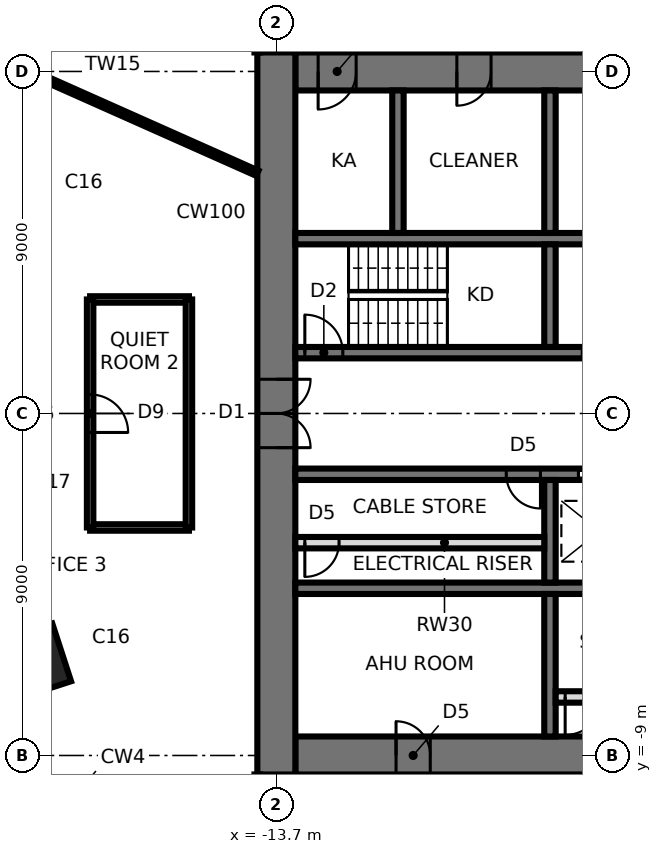
"""IFC4 building model, lengths in metres.
Left out: names, types, materials, properties, quantities, classifications, styles, units other than length and angle.
Written with IfcOpenShell. Run it as: python <this file> out.ifc"""

import sys

from ifc_helpers import new_model, si_unit, direction, frame, frame_2d, origin, origin_2d, place, context, subcontext, project, spatial, rectangle, extrude, element, fill, save


model = new_model("IFC4")
c1 = context("Model", 3, precision=1e-05, world=origin(), true_north=direction((0.0, 1.0)))
c2 = subcontext(c1, "Body", "Model", "MODEL_VIEW")
j1 = project(units=[si_unit("LENGTHUNIT", "METRE"), si_unit("PLANEANGLEUNIT", "RADIAN")], contexts=[c1])
p1 = place(None, origin())
s1 = spatial("IfcSite", under=j1, at=p1, CompositionType="ELEMENT")
p2 = place(p1, origin())
s2 = spatial("IfcBuilding", under=s1, at=p2, CompositionType="ELEMENT")
p3 = place(p2, frame((0.0, 0.0, 127.5)))
s3 = spatial("IfcBuildingStorey", under=s2, at=p3, CompositionType="ELEMENT", Elevation=127.5)
p4 = place(p3, frame((-20.109, -6.534, 0.0), z_axis=(0.0, 0.0, 1.0), x_axis=(-0.951056516295, -0.309016994375, 0.0)))
e1 = element("IfcColumn", 1, at=p4, inside=s3, PredefinedType="COLUMN", context=c2, shape_type="SweptSolid", body=[
    extrude(rectangle(XDim=1.6, YDim=1.6, at=origin_2d()), origin(), (0.0, 0.0, 1.0), 3.9),
])
p5 = place(p3, frame((-13.2, -9.0, 0.0), z_axis=(0.0, 0.0, 1.0), x_axis=(1.0, 0.0, 0.0)))
e2 = element("IfcWall", 2, at=p5, inside=s3, PredefinedType="SHEAR", context=c2, shape_type="SweptSolid", body=[
    extrude(rectangle(XDim=26.4, YDim=1.0, at=frame_2d((13.2, 0.0))), origin(), (0.0, 0.0, 1.0), 3.9),
])
p6 = place(p5, frame((2.65, 0.0, 0.0)))
e3 = element("IfcOpeningElement", 3, at=p6, cuts=e2, PredefinedType="OPENING", context=c2, shape_type="SweptSolid", body=[
    extrude(rectangle(XDim=0.9, YDim=2.1, at=frame_2d((0.45, 1.05))), frame((0.0, 0.51, 0.0), z_axis=(0.0, -1.0, 0.0), x_axis=(1.0, 0.0, 0.0)), (0.0, 0.0, 1.0), 1.02),
])
p7 = place(p5, frame((9.5, 0.0, 0.0)))
e4 = element("IfcOpeningElement", 4, at=p7, cuts=e2, PredefinedType="OPENING", context=c2, shape_type="SweptSolid", body=[
    extrude(rectangle(XDim=0.9, YDim=2.1, at=frame_2d((0.45, 1.05))), frame((0.0, 0.51, 0.0), z_axis=(0.0, -1.0, 0.0), x_axis=(1.0, 0.0, 0.0)), (0.0, 0.0, 1.0), 1.02),
])
p8 = place(p5, frame((16.0, 0.0, 0.0)))
e5 = element("IfcOpeningElement", 5, at=p8, cuts=e2, PredefinedType="OPENING", context=c2, shape_type="SweptSolid", body=[
    extrude(rectangle(XDim=0.9, YDim=2.1, at=frame_2d((0.45, 1.05))), frame((0.0, 0.51, 0.0), z_axis=(0.0, -1.0, 0.0), x_axis=(1.0, 0.0, 0.0)), (0.0, 0.0, 1.0), 1.02),
])
p9 = place(p5, frame((22.85, 0.0, 0.0)))
e6 = element("IfcOpeningElement", 6, at=p9, cuts=e2, PredefinedType="OPENING", context=c2, shape_type="SweptSolid", body=[
    extrude(rectangle(XDim=0.9, YDim=2.1, at=frame_2d((0.45, 1.05))), frame((0.0, 0.51, 0.0), z_axis=(0.0, -1.0, 0.0), x_axis=(1.0, 0.0, 0.0)), (0.0, 0.0, 1.0), 1.02),
])
p10 = place(p3, frame((13.2, 9.0, 0.0), z_axis=(0.0, 0.0, 1.0), x_axis=(-1.0, 0.0, 0.0)))
e7 = element("IfcWall", 7, at=p10, inside=s3, PredefinedType="SHEAR", context=c2, shape_type="SweptSolid", body=[
    extrude(rectangle(XDim=26.4, YDim=1.0, at=frame_2d((13.2, 0.0))), origin(), (0.0, 0.0, 1.0), 3.9),
])
p11 = place(p10, frame((2.65, 0.0, 0.0)))
e8 = element("IfcOpeningElement", 8, at=p11, cuts=e7, PredefinedType="OPENING", context=c2, shape_type="SweptSolid", body=[
    extrude(rectangle(XDim=0.9, YDim=2.1, at=frame_2d((0.45, 1.05))), frame((0.0, 0.51, 0.0), z_axis=(0.0, -1.0, 0.0), x_axis=(1.0, 0.0, 0.0)), (0.0, 0.0, 1.0), 1.02),
])
p12 = place(p10, frame((9.5, 0.0, 0.0)))
e9 = element("IfcOpeningElement", 9, at=p12, cuts=e7, PredefinedType="OPENING", context=c2, shape_type="SweptSolid", body=[
    extrude(rectangle(XDim=0.9, YDim=2.1, at=frame_2d((0.45, 1.05))), frame((0.0, 0.51, 0.0), z_axis=(0.0, -1.0, 0.0), x_axis=(1.0, 0.0, 0.0)), (0.0, 0.0, 1.0), 1.02),
])
p13 = place(p10, frame((16.0, 0.0, 0.0)))
e10 = element("IfcOpeningElement", 10, at=p13, cuts=e7, PredefinedType="OPENING", context=c2, shape_type="SweptSolid", body=[
    extrude(rectangle(XDim=0.9, YDim=2.1, at=frame_2d((0.45, 1.05))), frame((0.0, 0.51, 0.0), z_axis=(0.0, -1.0, 0.0), x_axis=(1.0, 0.0, 0.0)), (0.0, 0.0, 1.0), 1.02),
])
p14 = place(p10, frame((21.25, 0.0, 0.0)))
e11 = element("IfcOpeningElement", 11, at=p14, cuts=e7, PredefinedType="OPENING", context=c2, shape_type="SweptSolid", body=[
    extrude(rectangle(XDim=0.9, YDim=2.1, at=frame_2d((0.45, 1.05))), frame((0.0, 0.51, 0.0), z_axis=(0.0, -1.0, 0.0), x_axis=(1.0, 0.0, 0.0)), (0.0, 0.0, 1.0), 1.02),
])
p15 = place(p10, frame((24.8, 0.0, 0.0)))
e12 = element("IfcOpeningElement", 12, at=p15, cuts=e7, PredefinedType="OPENING", context=c2, shape_type="SweptSolid", body=[
    extrude(rectangle(XDim=1.0, YDim=2.1, at=frame_2d((0.5, 1.05))), frame((0.0, 0.51, 0.0), z_axis=(0.0, -1.0, 0.0), x_axis=(1.0, 0.0, 0.0)), (0.0, 0.0, 1.0), 1.02),
])
p16 = place(p3, frame((-13.7, 9.5, 0.0), z_axis=(0.0, 0.0, 1.0), x_axis=(0.0, -1.0, 0.0)))
e13 = element("IfcWall", 13, at=p16, inside=s3, PredefinedType="SHEAR", context=c2, shape_type="SweptSolid", body=[
    extrude(rectangle(XDim=19.0, YDim=1.0, at=frame_2d((9.5, 0.0))), origin(), (0.0, 0.0, 1.0), 3.9),
])
p17 = place(p16, frame((8.6, 0.0, 0.0)))
e14 = element("IfcOpeningElement", 14, at=p17, cuts=e13, PredefinedType="OPENING", context=c2, shape_type="SweptSolid", body=[
    extrude(rectangle(XDim=1.8, YDim=2.4, at=frame_2d((0.9, 1.2))), frame((0.0, 0.51, 0.0), z_axis=(0.0, -1.0, 0.0), x_axis=(1.0, 0.0, 0.0)), (0.0, 0.0, 1.0), 1.02),
])
p18 = place(p3, frame((-13.2, 1.6, 0.0), z_axis=(0.0, 0.0, 1.0), x_axis=(1.0, 0.0, 0.0)))
e15 = element("IfcWall", 15, at=p18, inside=s3, PredefinedType="SHEAR", context=c2, shape_type="SweptSolid", body=[
    extrude(rectangle(XDim=26.4, YDim=0.3, at=frame_2d((13.2, 0.0))), origin(), (0.0, 0.0, 1.0), 3.9),
])
p19 = place(p18, frame((0.25, 0.0, 0.0)))
e16 = element("IfcOpeningElement", 16, at=p19, cuts=e15, PredefinedType="OPENING", context=c2, shape_type="SweptSolid", body=[
    extrude(rectangle(XDim=1.0, YDim=2.1, at=frame_2d((0.5, 1.05))), frame((0.0, 0.16, 0.0), z_axis=(0.0, -1.0, 0.0), x_axis=(1.0, 0.0, 0.0)), (0.0, 0.0, 1.0), 0.32),
])
p20 = place(p18, frame((20.25, 0.0, 0.0)))
e17 = element("IfcOpeningElement", 17, at=p20, cuts=e15, PredefinedType="OPENING", context=c2, shape_type="SweptSolid", body=[
    extrude(rectangle(XDim=1.5, YDim=2.4, at=frame_2d((0.75, 1.2))), frame((0.0, 0.16, 0.0), z_axis=(0.0, -1.0, 0.0), x_axis=(1.0, 0.0, 0.0)), (0.0, 0.0, 1.0), 0.32),
])
p21 = place(p18, frame((7.55, 0.0, 0.0)))
e18 = element("IfcOpeningElement", 18, at=p21, cuts=e15, PredefinedType="OPENING", context=c2, shape_type="SweptSolid", body=[
    extrude(rectangle(XDim=0.9, YDim=2.1, at=frame_2d((0.45, 1.05))), frame((0.0, 0.16, 0.0), z_axis=(0.0, -1.0, 0.0), x_axis=(1.0, 0.0, 0.0)), (0.0, 0.0, 1.0), 0.32),
])
p22 = place(p18, frame((10.15, 0.0, 0.0)))
e19 = element("IfcOpeningElement", 19, at=p22, cuts=e15, PredefinedType="OPENING", context=c2, shape_type="SweptSolid", body=[
    extrude(rectangle(XDim=0.9, YDim=2.1, at=frame_2d((0.45, 1.05))), frame((0.0, 0.16, 0.0), z_axis=(0.0, -1.0, 0.0), x_axis=(1.0, 0.0, 0.0)), (0.0, 0.0, 1.0), 0.32),
])
p23 = place(p18, frame((12.75, 0.0, 0.0)))
e20 = element("IfcOpeningElement", 20, at=p23, cuts=e15, PredefinedType="OPENING", context=c2, shape_type="SweptSolid", body=[
    extrude(rectangle(XDim=0.9, YDim=2.1, at=frame_2d((0.45, 1.05))), frame((0.0, 0.16, 0.0), z_axis=(0.0, -1.0, 0.0), x_axis=(1.0, 0.0, 0.0)), (0.0, 0.0, 1.0), 0.32),
])
p24 = place(p18, frame((24.15, 0.0, 0.0)))
e21 = element("IfcOpeningElement", 21, at=p24, cuts=e15, PredefinedType="OPENING", context=c2, shape_type="SweptSolid", body=[
    extrude(rectangle(XDim=0.9, YDim=2.1, at=frame_2d((0.45, 1.05))), frame((0.0, 0.16, 0.0), z_axis=(0.0, -1.0, 0.0), x_axis=(1.0, 0.0, 0.0)), (0.0, 0.0, 1.0), 0.32),
])
p25 = place(p3, frame((-13.2, -1.6, 0.0), z_axis=(0.0, 0.0, 1.0), x_axis=(1.0, 0.0, 0.0)))
e22 = element("IfcWall", 22, at=p25, inside=s3, PredefinedType="SHEAR", context=c2, shape_type="SweptSolid", body=[
    extrude(rectangle(XDim=26.4, YDim=0.3, at=frame_2d((13.2, 0.0))), origin(), (0.0, 0.0, 1.0), 3.9),
])
p26 = place(p25, frame((25.15, 0.0, 0.0)))
e23 = element("IfcOpeningElement", 23, at=p26, cuts=e22, PredefinedType="OPENING", context=c2, shape_type="SweptSolid", body=[
    extrude(rectangle(XDim=1.0, YDim=2.1, at=frame_2d((0.5, 1.05))), frame((0.0, 0.16, 0.0), z_axis=(0.0, -1.0, 0.0), x_axis=(1.0, 0.0, 0.0)), (0.0, 0.0, 1.0), 0.32),
])
p27 = place(p25, frame((7.45, 0.0, 0.0)))
e24 = element("IfcOpeningElement", 24, at=p27, cuts=e22, PredefinedType="OPENING", context=c2, shape_type="SweptSolid", body=[
    extrude(rectangle(XDim=1.1, YDim=2.3, at=frame_2d((0.55, 1.15))), frame((0.0, 0.16, 0.0), z_axis=(0.0, -1.0, 0.0), x_axis=(1.0, 0.0, 0.0)), (0.0, 0.0, 1.0), 0.32),
])
p28 = place(p25, frame((10.05, 0.0, 0.0)))
e25 = element("IfcOpeningElement", 25, at=p28, cuts=e22, PredefinedType="OPENING", context=c2, shape_type="SweptSolid", body=[
    extrude(rectangle(XDim=1.1, YDim=2.3, at=frame_2d((0.55, 1.15))), frame((0.0, 0.16, 0.0), z_axis=(0.0, -1.0, 0.0), x_axis=(1.0, 0.0, 0.0)), (0.0, 0.0, 1.0), 0.32),
])
p29 = place(p25, frame((12.65, 0.0, 0.0)))
e26 = element("IfcOpeningElement", 26, at=p29, cuts=e22, PredefinedType="OPENING", context=c2, shape_type="SweptSolid", body=[
    extrude(rectangle(XDim=1.1, YDim=2.3, at=frame_2d((0.55, 1.15))), frame((0.0, 0.16, 0.0), z_axis=(0.0, -1.0, 0.0), x_axis=(1.0, 0.0, 0.0)), (0.0, 0.0, 1.0), 0.32),
])
p30 = place(p25, frame((15.25, 0.0, 0.0)))
e27 = element("IfcOpeningElement", 27, at=p30, cuts=e22, PredefinedType="OPENING", context=c2, shape_type="SweptSolid", body=[
    extrude(rectangle(XDim=1.1, YDim=2.3, at=frame_2d((0.55, 1.15))), frame((0.0, 0.16, 0.0), z_axis=(0.0, -1.0, 0.0), x_axis=(1.0, 0.0, 0.0)), (0.0, 0.0, 1.0), 0.32),
])
p31 = place(p25, frame((17.85, 0.0, 0.0)))
e28 = element("IfcOpeningElement", 28, at=p31, cuts=e22, PredefinedType="OPENING", context=c2, shape_type="SweptSolid", body=[
    extrude(rectangle(XDim=1.1, YDim=2.3, at=frame_2d((0.55, 1.15))), frame((0.0, 0.16, 0.0), z_axis=(0.0, -1.0, 0.0), x_axis=(1.0, 0.0, 0.0)), (0.0, 0.0, 1.0), 0.32),
])
p32 = place(p25, frame((5.55, 0.0, 0.0)))
e29 = element("IfcOpeningElement", 29, at=p32, cuts=e22, PredefinedType="OPENING", context=c2, shape_type="SweptSolid", body=[
    extrude(rectangle(XDim=0.9, YDim=2.1, at=frame_2d((0.45, 1.05))), frame((0.0, 0.16, 0.0), z_axis=(0.0, -1.0, 0.0), x_axis=(1.0, 0.0, 0.0)), (0.0, 0.0, 1.0), 0.32),
])
for number, where, z_axis, x_axis in (
    (30, (-13.2, 4.6, 0.0), (0.0, 0.0, 1.0), (1.0, 0.0, 0.0)),
    (31, (-13.2, -4.6, 0.0), (0.0, 0.0, 1.0), (1.0, 0.0, 0.0)),
):
    element("IfcWall", number, at=place(p3, frame(where, z_axis=z_axis, x_axis=x_axis)), inside=s3, PredefinedType="SHEAR", context=c2, shape_type="SweptSolid", body=[
        extrude(rectangle(XDim=26.4, YDim=0.3, at=frame_2d((13.2, 0.0))), origin(), (0.0, 0.0, 1.0), 3.9),
    ])
p33 = place(p3, frame((-6.5, 1.75, 0.0), z_axis=(0.0, 0.0, 1.0), x_axis=(0.0, 1.0, 0.0)))
e32 = element("IfcWall", 32, at=p33, inside=s3, PredefinedType="SHEAR", context=c2, shape_type="SweptSolid", body=[
    extrude(rectangle(XDim=2.7, YDim=0.3, at=frame_2d((1.35, 0.0))), origin(), (0.0, 0.0, 1.0), 3.9),
])
p34 = place(p3, frame((-6.5, 4.75, 0.0), z_axis=(0.0, 0.0, 1.0), x_axis=(0.0, 1.0, 0.0)))
e33 = element("IfcWall", 33, at=p34, inside=s3, PredefinedType="SHEAR", context=c2, shape_type="SweptSolid", body=[
    extrude(rectangle(XDim=3.75, YDim=0.3, at=frame_2d((1.875, 0.0))), origin(), (0.0, 0.0, 1.0), 3.9),
])
p35 = place(p3, frame((-6.5, -1.75, 0.0), z_axis=(0.0, 0.0, 1.0), x_axis=(0.0, -1.0, 0.0)))
e34 = element("IfcWall", 34, at=p35, inside=s3, PredefinedType="SHEAR", context=c2, shape_type="SweptSolid", body=[
    extrude(rectangle(XDim=2.7, YDim=0.3, at=frame_2d((1.35, 0.0))), origin(), (0.0, 0.0, 1.0), 3.9),
])
for number, where, z_axis, x_axis in (
    (35, (-6.5, -4.75, 0.0), (0.0, 0.0, 1.0), (0.0, -1.0, 0.0)),
    (36, (-10.5, 4.75, 0.0), (0.0, 0.0, 1.0), (0.0, 1.0, 0.0)),
):
    element("IfcWall", number, at=place(p3, frame(where, z_axis=z_axis, x_axis=x_axis)), inside=s3, PredefinedType="SHEAR", context=c2, shape_type="SweptSolid", body=[
        extrude(rectangle(XDim=3.75, YDim=0.3, at=frame_2d((1.875, 0.0))), origin(), (0.0, 0.0, 1.0), 3.9),
    ])
p36 = place(p3, frame((-6.35, -7.46, 0.0), z_axis=(0.0, 0.0, 1.0), x_axis=(1.0, 0.0, 0.0)))
e37 = element("IfcWall", 37, at=p36, inside=s3, PredefinedType="PARTITIONING", context=c2, shape_type="SweptSolid", body=[
    extrude(rectangle(XDim=6.2, YDim=0.3, at=frame_2d((3.1, 0.0))), origin(), (0.0, 0.0, 1.0), 3.74),
])
p37 = place(p36, frame((0.25, 0.0, 0.0)))
e38 = element("IfcOpeningElement", 38, at=p37, cuts=e37, PredefinedType="OPENING", context=c2, shape_type="SweptSolid", body=[
    extrude(rectangle(XDim=1.0, YDim=2.4, at=frame_2d((0.5, 1.2))), frame((0.0, 0.16, 0.0), z_axis=(0.0, -1.0, 0.0), x_axis=(1.0, 0.0, 0.0)), (0.0, 0.0, 1.0), 0.32),
])
p38 = place(p3, frame((-13.2, -3.4, 0.0), z_axis=(0.0, 0.0, 1.0), x_axis=(1.0, 0.0, 0.0)))
e39 = element("IfcWall", 39, at=p38, inside=s3, PredefinedType="SOLIDWALL", context=c2, shape_type="SweptSolid", body=[
    extrude(rectangle(XDim=6.55, YDim=0.3, at=frame_2d((3.275, 0.0))), origin(), (0.0, 0.0, 1.0), 3.74),
])
p39 = place(p38, frame((0.25, 0.0, 0.0)))
e40 = element("IfcOpeningElement", 40, at=p39, cuts=e39, PredefinedType="OPENING", context=c2, shape_type="SweptSolid", body=[
    extrude(rectangle(XDim=0.9, YDim=2.1, at=frame_2d((0.45, 1.05))), frame((0.0, 0.16, 0.0), z_axis=(0.0, -1.0, 0.0), x_axis=(1.0, 0.0, 0.0)), (0.0, 0.0, 1.0), 0.32),
])
p40 = place(p3, frame((-16.0, -3.0, 0.0), z_axis=(0.0, 0.0, 1.0), x_axis=(-1.0, 0.0, 0.0)))
e41 = element("IfcWall", 41, at=p40, inside=s3, PredefinedType="PARTITIONING", context=c2, shape_type="SweptSolid", body=[
    extrude(rectangle(XDim=2.6, YDim=0.17, at=frame_2d((1.3, 0.0))), origin(), (0.0, 0.0, 1.0), 3.74),
])
p41 = place(p3, frame((-14.2, -9.5, 0.0), z_axis=(0.0, 0.0, 1.0), x_axis=(0.0, -1.0, 0.0)))
e42 = element("IfcWall", 42, at=p41, inside=s3, PredefinedType="PARTITIONING", context=c2, shape_type="SweptSolid", body=[
    extrude(rectangle(XDim=1.8, YDim=0.15, at=frame_2d((0.9, 0.0))), origin(), (0.0, 0.0, 1.0), 3.74),
])
p42 = place(p3, frame((-14.2, 6.322, 0.0), z_axis=(0.0, 0.0, 1.0), x_axis=(-0.913544220381, 0.406739421999, 0.0)))
e43 = element("IfcWall", 43, at=p42, inside=s3, PredefinedType="PARTITIONING", context=c2, shape_type="SweptSolid", body=[
    extrude(rectangle(XDim=9.271, YDim=0.15, at=frame_2d((4.636, 0.0))), origin(), (0.0, 0.0, 1.0), 3.74),
])
p43 = place(p3, frame((-18.6, 3.0, 0.0), z_axis=(0.0, 0.0, 1.0), x_axis=(1.0, 0.0, 0.0)))
e44 = element("IfcWall", 44, at=p43, inside=s3, PredefinedType="PARTITIONING", context=c2, shape_type="SweptSolid", body=[
    extrude(rectangle(XDim=2.6, YDim=0.17, at=frame_2d((1.3, 0.0))), origin(), (0.0, 0.0, 1.0), 3.74),
])
p44 = place(p3, frame((-18.6, -3.0, 0.0), z_axis=(0.0, 0.0, 1.0), x_axis=(0.0, 1.0, 0.0)))
e45 = element("IfcWall", 45, at=p44, inside=s3, PredefinedType="PARTITIONING", context=c2, shape_type="SweptSolid", body=[
    extrude(rectangle(XDim=6.0, YDim=0.17, at=frame_2d((3.0, 0.0))), origin(), (0.0, 0.0, 1.0), 3.74),
])
p45 = place(p44, frame((2.5, 0.0, 0.0)))
e46 = element("IfcOpeningElement", 46, at=p45, cuts=e45, PredefinedType="OPENING", context=c2, shape_type="SweptSolid", body=[
    extrude(rectangle(XDim=1.0, YDim=2.4, at=frame_2d((0.5, 1.2))), frame((0.0, 0.095, 0.0), z_axis=(0.0, -1.0, 0.0), x_axis=(1.0, 0.0, 0.0)), (0.0, 0.0, 1.0), 0.19),
])
p46 = place(p3, frame((-16.0, 3.0, 0.0), z_axis=(0.0, 0.0, 1.0), x_axis=(0.0, -1.0, 0.0)))
e47 = element("IfcWall", 47, at=p46, inside=s3, PredefinedType="PARTITIONING", context=c2, shape_type="SweptSolid", body=[
    extrude(rectangle(XDim=6.0, YDim=0.17, at=frame_2d((3.0, 0.0))), origin(), (0.0, 0.0, 1.0), 3.74),
])
p47 = place(p17, origin())
e48 = element("IfcDoor", 48, at=p47, inside=s3, OperationType="DOUBLE_DOOR_SINGLE_SWING", PredefinedType="DOOR", context=c2, shape_type="SweptSolid", body=[
    extrude(rectangle(XDim=1.72, YDim=2.36, at=frame_2d((0.9, 1.18))), frame((0.0, 0.025, 0.0), z_axis=(0.0, -1.0, 0.0), x_axis=(1.0, 0.0, 0.0)), (0.0, 0.0, 1.0), 0.05),
    extrude(rectangle(XDim=0.04, YDim=2.4, at=frame_2d((0.02, 1.2))), frame((0.0, 0.25, 0.0), z_axis=(0.0, -1.0, 0.0), x_axis=(1.0, 0.0, 0.0)), (0.0, 0.0, 1.0), 0.5),
    extrude(rectangle(XDim=0.04, YDim=2.4, at=frame_2d((1.78, 1.2))), frame((0.0, 0.25, 0.0), z_axis=(0.0, -1.0, 0.0), x_axis=(1.0, 0.0, 0.0)), (0.0, 0.0, 1.0), 0.5),
    extrude(rectangle(XDim=1.72, YDim=0.04, at=frame_2d((0.9, 2.38))), frame((0.0, 0.25, 0.0), z_axis=(0.0, -1.0, 0.0), x_axis=(1.0, 0.0, 0.0)), (0.0, 0.0, 1.0), 0.5),
])
fill(e14, e48)
p48 = place(p19, origin())
e49 = element("IfcDoor", 49, at=p48, inside=s3, OperationType="SINGLE_SWING_LEFT", PredefinedType="DOOR", context=c2, shape_type="SweptSolid", body=[
    extrude(rectangle(XDim=1.0, YDim=2.1, at=frame_2d((0.5, 1.05))), frame((0.0, 0.025, 0.0), z_axis=(0.0, -1.0, 0.0), x_axis=(1.0, 0.0, 0.0)), (0.0, 0.0, 1.0), 0.05),
])
fill(e16, e49)
p49 = place(p27, frame((1.1, 0.0, 0.0), z_axis=(0.0, 0.0, 1.0), x_axis=(-1.0, 0.0, 0.0)))
e50 = element("IfcDoor", 50, at=p49, inside=s3, OperationType="SLIDING_TO_LEFT", PredefinedType="DOOR", context=c2, shape_type="SweptSolid", body=[
    extrude(rectangle(XDim=1.1, YDim=2.3, at=frame_2d((0.55, 1.15))), frame((0.0, 0.025, 0.0), z_axis=(0.0, -1.0, 0.0), x_axis=(1.0, 0.0, 0.0)), (0.0, 0.0, 1.0), 0.05),
])
fill(e24, e50)
p50 = place(p32, frame((0.9, 0.0, 0.0), z_axis=(0.0, 0.0, 1.0), x_axis=(-1.0, 0.0, 0.0)))
e51 = element("IfcDoor", 51, at=p50, inside=s3, OperationType="SINGLE_SWING_LEFT", PredefinedType="DOOR", context=c2, shape_type="SweptSolid", body=[
    extrude(rectangle(XDim=0.9, YDim=2.1, at=frame_2d((0.45, 1.05))), frame((0.0, 0.025, 0.0), z_axis=(0.0, -1.0, 0.0), x_axis=(1.0, 0.0, 0.0)), (0.0, 0.0, 1.0), 0.05),
])
fill(e29, e51)
p51 = place(p14, origin())
e52 = element("IfcDoor", 52, at=p51, inside=s3, OperationType="SINGLE_SWING_RIGHT", PredefinedType="DOOR", context=c2, shape_type="SweptSolid", body=[
    extrude(rectangle(XDim=0.82, YDim=2.06, at=frame_2d((0.45, 1.03))), frame((0.0, 0.025, 0.0), z_axis=(0.0, -1.0, 0.0), x_axis=(1.0, 0.0, 0.0)), (0.0, 0.0, 1.0), 0.05),
    extrude(rectangle(XDim=0.04, YDim=2.1, at=frame_2d((0.02, 1.05))), frame((0.0, 0.25, 0.0), z_axis=(0.0, -1.0, 0.0), x_axis=(1.0, 0.0, 0.0)), (0.0, 0.0, 1.0), 0.5),
    extrude(rectangle(XDim=0.04, YDim=2.1, at=frame_2d((0.88, 1.05))), frame((0.0, 0.25, 0.0), z_axis=(0.0, -1.0, 0.0), x_axis=(1.0, 0.0, 0.0)), (0.0, 0.0, 1.0), 0.5),
    extrude(rectangle(XDim=0.82, YDim=0.04, at=frame_2d((0.45, 2.08))), frame((0.0, 0.25, 0.0), z_axis=(0.0, -1.0, 0.0), x_axis=(1.0, 0.0, 0.0)), (0.0, 0.0, 1.0), 0.5),
])
fill(e11, e52)
p52 = place(p15, origin())
e53 = element("IfcDoor", 53, at=p52, inside=s3, OperationType="SINGLE_SWING_RIGHT", PredefinedType="DOOR", context=c2, shape_type="SweptSolid", body=[
    extrude(rectangle(XDim=0.92, YDim=2.06, at=frame_2d((0.5, 1.03))), frame((0.0, 0.025, 0.0), z_axis=(0.0, -1.0, 0.0), x_axis=(1.0, 0.0, 0.0)), (0.0, 0.0, 1.0), 0.05),
    extrude(rectangle(XDim=0.04, YDim=2.1, at=frame_2d((0.02, 1.05))), frame((0.0, 0.25, 0.0), z_axis=(0.0, -1.0, 0.0), x_axis=(1.0, 0.0, 0.0)), (0.0, 0.0, 1.0), 0.5),
    extrude(rectangle(XDim=0.04, YDim=2.1, at=frame_2d((0.98, 1.05))), frame((0.0, 0.25, 0.0), z_axis=(0.0, -1.0, 0.0), x_axis=(1.0, 0.0, 0.0)), (0.0, 0.0, 1.0), 0.5),
    extrude(rectangle(XDim=0.92, YDim=0.04, at=frame_2d((0.5, 2.08))), frame((0.0, 0.25, 0.0), z_axis=(0.0, -1.0, 0.0), x_axis=(1.0, 0.0, 0.0)), (0.0, 0.0, 1.0), 0.5),
])
fill(e12, e53)
p53 = place(p6, origin())
e54 = element("IfcDoor", 54, at=p53, inside=s3, OperationType="SINGLE_SWING_LEFT", PredefinedType="DOOR", context=c2, shape_type="SweptSolid", body=[
    extrude(rectangle(XDim=0.82, YDim=2.06, at=frame_2d((0.45, 1.03))), frame((0.0, 0.025, 0.0), z_axis=(0.0, -1.0, 0.0), x_axis=(1.0, 0.0, 0.0)), (0.0, 0.0, 1.0), 0.05),
    extrude(rectangle(XDim=0.04, YDim=2.1, at=frame_2d((0.02, 1.05))), frame((0.0, 0.25, 0.0), z_axis=(0.0, -1.0, 0.0), x_axis=(1.0, 0.0, 0.0)), (0.0, 0.0, 1.0), 0.5),
    extrude(rectangle(XDim=0.04, YDim=2.1, at=frame_2d((0.88, 1.05))), frame((0.0, 0.25, 0.0), z_axis=(0.0, -1.0, 0.0), x_axis=(1.0, 0.0, 0.0)), (0.0, 0.0, 1.0), 0.5),
    extrude(rectangle(XDim=0.82, YDim=0.04, at=frame_2d((0.45, 2.08))), frame((0.0, 0.25, 0.0), z_axis=(0.0, -1.0, 0.0), x_axis=(1.0, 0.0, 0.0)), (0.0, 0.0, 1.0), 0.5),
])
fill(e3, e54)
p54 = place(p37, frame((1.0, 0.0, 0.0), z_axis=(0.0, 0.0, 1.0), x_axis=(-1.0, 0.0, 0.0)))
e55 = element("IfcDoor", 55, at=p54, inside=s3, OperationType="SINGLE_SWING_RIGHT", PredefinedType="DOOR", context=c2, shape_type="SweptSolid", body=[
    extrude(rectangle(XDim=1.0, YDim=2.4, at=frame_2d((0.5, 1.2))), frame((0.0, 0.025, 0.0), z_axis=(0.0, -1.0, 0.0), x_axis=(1.0, 0.0, 0.0)), (0.0, 0.0, 1.0), 0.05),
])
fill(e38, e55)
p55 = place(p39, frame((0.9, 0.0, 0.0), z_axis=(0.0, 0.0, 1.0), x_axis=(-1.0, 0.0, 0.0)))
e56 = element("IfcDoor", 56, at=p55, inside=s3, OperationType="SINGLE_SWING_RIGHT", PredefinedType="DOOR", context=c2, shape_type="SweptSolid", body=[
    extrude(rectangle(XDim=0.9, YDim=2.1, at=frame_2d((0.45, 1.05))), frame((0.0, 0.025, 0.0), z_axis=(0.0, -1.0, 0.0), x_axis=(1.0, 0.0, 0.0)), (0.0, 0.0, 1.0), 0.05),
])
fill(e40, e56)
p56 = place(p45, frame((1.0, 0.0, 0.0), z_axis=(0.0, 0.0, 1.0), x_axis=(-1.0, 0.0, 0.0)))
e57 = element("IfcDoor", 57, at=p56, inside=s3, OperationType="SINGLE_SWING_RIGHT", PredefinedType="DOOR", context=c2, shape_type="SweptSolid", body=[
    extrude(rectangle(XDim=1.0, YDim=2.4, at=frame_2d((0.5, 1.2))), frame((0.0, 0.025, 0.0), z_axis=(0.0, -1.0, 0.0), x_axis=(1.0, 0.0, 0.0)), (0.0, 0.0, 1.0), 0.05),
])
fill(e46, e57)
save(model, sys.argv[1])
